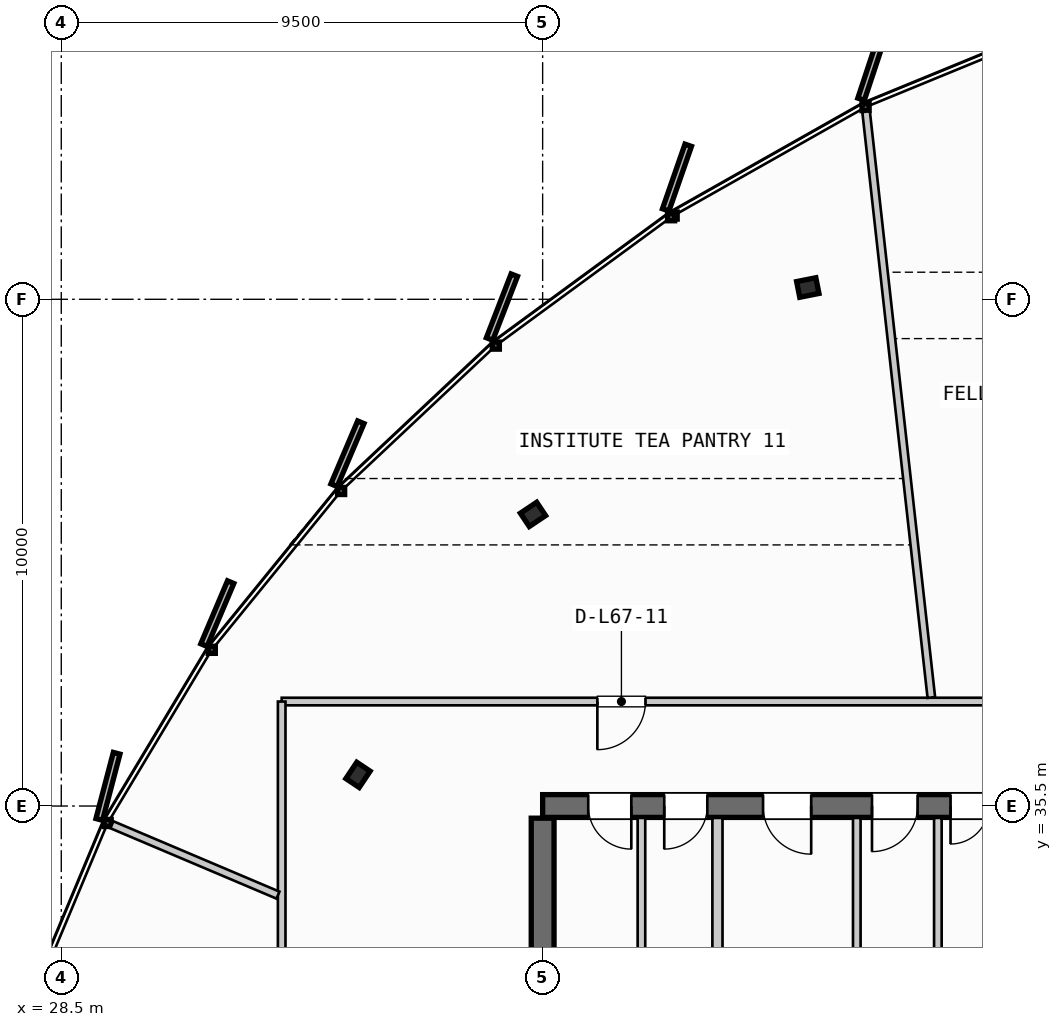
"""IFC4 building model, lengths in metres.
Left out: names, types, materials, properties, quantities, classifications, styles, units other than length and angle.
Written with IfcOpenShell. Run it as: python <this file> out.ifc"""

import sys

from ifc_helpers import new_model, si_unit, direction, frame, frame_2d, origin, origin_2d, place, context, subcontext, project, spatial, rectangle, i_section, extrude, source, transform, mapped, element, fill, save


model = new_model("IFC4")
c1 = context("Model", 3, precision=1e-05, world=origin(), true_north=direction((0.0, 1.0)))
c2 = subcontext(c1, "Body", "Model", "MODEL_VIEW")
j1 = project(units=[si_unit("LENGTHUNIT", "METRE"), si_unit("PLANEANGLEUNIT", "RADIAN")], contexts=[c1])
p1 = place(None, origin())
s1 = spatial("IfcSite", under=j1, at=p1, CompositionType="ELEMENT")
p2 = place(p1, origin())
s2 = spatial("IfcBuilding", under=s1, at=p2, CompositionType="ELEMENT")
p3 = place(p2, frame((0.0, 0.0, 256.0)))
s3 = spatial("IfcBuildingStorey", under=s2, at=p3, CompositionType="ELEMENT", Elevation=256.0)
p4 = place(p3, frame((55.6, 35.5, 0.0), z_axis=(0.0, 0.0, 1.0), x_axis=(-1.0, 0.0, 0.0)))
e1 = element("IfcWall", 1, at=p4, inside=s3, PredefinedType="SHEAR", context=c2, shape_type="SweptSolid", body=[
    extrude(rectangle(XDim=17.6, YDim=0.45, at=frame_2d((8.8, 0.0))), origin(), (0.0, 0.0, 1.0), 3.21),
])
p5 = place(p4, frame((8.05, 0.0, 0.0)))
e2 = element("IfcOpeningElement", 2, at=p5, cuts=e1, PredefinedType="OPENING", context=c2, shape_type="SweptSolid", body=[
    extrude(rectangle(XDim=1.5, YDim=2.2, at=frame_2d((0.75, 1.1))), frame((0.0, 0.235, 0.0), z_axis=(0.0, -1.0, 0.0), x_axis=(1.0, 0.0, 0.0)), (0.0, 0.0, 1.0), 0.47),
])
p6 = place(p4, frame((15.85, 0.0, 0.0)))
e3 = element("IfcOpeningElement", 3, at=p6, cuts=e1, PredefinedType="OPENING", context=c2, shape_type="SweptSolid", body=[
    extrude(rectangle(XDim=0.85, YDim=2.15, at=frame_2d((0.425, 1.075))), frame((0.0, 0.235, 0.0), z_axis=(0.0, -1.0, 0.0), x_axis=(1.0, 0.0, 0.0)), (0.0, 0.0, 1.0), 0.47),
])
p7 = place(p4, frame((14.35, 0.0, 0.0)))
e4 = element("IfcOpeningElement", 4, at=p7, cuts=e1, PredefinedType="OPENING", context=c2, shape_type="SweptSolid", body=[
    extrude(rectangle(XDim=0.85, YDim=2.15, at=frame_2d((0.425, 1.075))), frame((0.0, 0.235, 0.0), z_axis=(0.0, -1.0, 0.0), x_axis=(1.0, 0.0, 0.0)), (0.0, 0.0, 1.0), 0.47),
])
p8 = place(p4, frame((12.3, 0.0, 0.0)))
e5 = element("IfcOpeningElement", 5, at=p8, cuts=e1, PredefinedType="OPENING", context=c2, shape_type="SweptSolid", body=[
    extrude(rectangle(XDim=0.95, YDim=2.15, at=frame_2d((0.475, 1.075))), frame((0.0, 0.235, 0.0), z_axis=(0.0, -1.0, 0.0), x_axis=(1.0, 0.0, 0.0)), (0.0, 0.0, 1.0), 0.47),
])
p9 = place(p4, frame((10.2, 0.0, 0.0)))
e6 = element("IfcOpeningElement", 6, at=p9, cuts=e1, PredefinedType="OPENING", context=c2, shape_type="SweptSolid", body=[
    extrude(rectangle(XDim=0.9, YDim=2.15, at=frame_2d((0.45, 1.075))), frame((0.0, 0.235, 0.0), z_axis=(0.0, -1.0, 0.0), x_axis=(1.0, 0.0, 0.0)), (0.0, 0.0, 1.0), 0.47),
])
p10 = place(p3, frame((38.0, 35.26, 0.0), z_axis=(0.0, 0.0, 1.0), x_axis=(0.0, -1.0, 0.0)))
e7 = element("IfcWall", 7, at=p10, inside=s3, PredefinedType="SHEAR", context=c2, shape_type="SweptSolid", body=[
    extrude(rectangle(XDim=14.92, YDim=0.45, at=frame_2d((7.46, 0.0))), origin(), (0.0, 0.0, 1.0), 3.21),
])
p11 = place(p10, frame((5.21, 0.0, 0.0)))
e8 = element("IfcOpeningElement", 8, at=p11, cuts=e7, PredefinedType="OPENING", context=c2, shape_type="SweptSolid", body=[
    extrude(rectangle(XDim=1.1, YDim=2.2, at=frame_2d((0.55, 1.1))), frame((0.0, 0.235, 0.0), z_axis=(0.0, -1.0, 0.0), x_axis=(1.0, 0.0, 0.0)), (0.0, 0.0, 1.0), 0.47),
])
m1 = source(origin(), c2, "Body", "SweptSolid", [
    extrude(i_section(OverallWidth=0.387, OverallDepth=0.316, WebThickness=0.019, FlangeThickness=0.028, FilletRadius=0.015, at=origin_2d()), origin(), (0.0, 0.0, 1.0), 3.21),
])
for number, where, z_axis, x_axis in (
    (9, (43.233, 45.732, 0.0), (0.0, 0.0, 1.0), (-0.195, 0.981, 0.0)),
    (10, (37.81, 41.255, 0.0), (0.0, 0.0, 1.0), (-0.556, 0.831, 0.0)),
    (11, (34.356, 36.115, 0.0), (0.0, 0.0, 1.0), (-0.831, 0.556, 0.0)),
):
    element("IfcColumn", number, at=place(p3, frame(where, z_axis=z_axis, x_axis=x_axis)), inside=s3, PredefinedType="COLUMN", context=c2, shape_type="MappedRepresentation", body=[
        mapped(m1, transform((0.0, 0.0, 0.0), scale=1.0)),
    ])
p12 = place(p3, frame((41.45, 31.85, 0.0), z_axis=(0.0, 0.0, 1.0), x_axis=(0.0, 1.0, 0.0)))
e12 = element("IfcWall", 12, at=p12, inside=s3, PredefinedType="PARTITIONING", context=c2, shape_type="SweptSolid", body=[
    extrude(rectangle(XDim=3.415, YDim=0.2, at=frame_2d((1.708, 0.0))), origin(), (0.0, 0.0, 1.0), 2.28),
])
for number, where, z_axis, x_axis in (
    (13, (45.8, 31.85, 0.0), (0.0, 0.0, 1.0), (0.0, 1.0, 0.0)),
    (14, (39.95, 31.85, 0.0), (0.0, 0.0, 1.0), (0.0, 1.0, 0.0)),
):
    element("IfcWall", number, at=place(p3, frame(where, z_axis=z_axis, x_axis=x_axis)), inside=s3, PredefinedType="PARTITIONING", context=c2, shape_type="SweptSolid", body=[
        extrude(rectangle(XDim=3.415, YDim=0.15, at=frame_2d((1.708, 0.0))), origin(), (0.0, 0.0, 1.0), 2.28),
    ])
p13 = place(p3, frame((44.2, 31.85, 0.0), z_axis=(0.0, 0.0, 1.0), x_axis=(0.0, 1.0, 0.0)))
e15 = element("IfcWall", 15, at=p13, inside=s3, PredefinedType="PLUMBINGWALL", context=c2, shape_type="SweptSolid", body=[
    extrude(rectangle(XDim=3.415, YDim=0.15, at=frame_2d((1.708, 0.0))), origin(), (0.0, 0.0, 1.0), 2.28),
])
p14 = place(p3, frame((60.888, 37.562, 0.0), z_axis=(0.0, 0.0, 1.0), x_axis=(-1.0, 0.0, 0.0)))
e16 = element("IfcWall", 16, at=p14, inside=s3, PredefinedType="PARTITIONING", context=c2, shape_type="SweptSolid", body=[
    extrude(rectangle(XDim=28.038, YDim=0.15, at=frame_2d((14.019, 0.0))), origin(), (0.0, 0.0, 1.0), 2.28),
])
p15 = place(p14, frame((5.994, 0.0, 0.0)))
e17 = element("IfcOpeningElement", 17, at=p15, cuts=e16, PredefinedType="OPENING", context=c2, shape_type="SweptSolid", body=[
    extrude(rectangle(XDim=0.95, YDim=2.15, at=frame_2d((0.475, 1.075))), frame((0.0, 0.085, 0.0), z_axis=(0.0, -1.0, 0.0), x_axis=(1.0, 0.0, 0.0)), (0.0, 0.0, 1.0), 0.17),
])
p16 = place(p14, frame((12.306, 0.0, 0.0)))
e18 = element("IfcOpeningElement", 18, at=p16, cuts=e16, PredefinedType="OPENING", context=c2, shape_type="SweptSolid", body=[
    extrude(rectangle(XDim=0.95, YDim=2.15, at=frame_2d((0.475, 1.075))), frame((0.0, 0.085, 0.0), z_axis=(0.0, -1.0, 0.0), x_axis=(1.0, 0.0, 0.0)), (0.0, 0.0, 1.0), 0.17),
])
p17 = place(p14, frame((20.858, 0.0, 0.0)))
e19 = element("IfcOpeningElement", 19, at=p17, cuts=e16, PredefinedType="OPENING", context=c2, shape_type="SweptSolid", body=[
    extrude(rectangle(XDim=0.95, YDim=2.15, at=frame_2d((0.475, 1.075))), frame((0.0, 0.085, 0.0), z_axis=(0.0, -1.0, 0.0), x_axis=(1.0, 0.0, 0.0)), (0.0, 0.0, 1.0), 0.17),
])
p18 = place(p3, frame((32.85, 37.562, 0.0), z_axis=(0.0, 0.0, 1.0), x_axis=(0.0, -1.0, 0.0)))
e20 = element("IfcWall", 20, at=p18, inside=s3, PredefinedType="PARTITIONING", context=c2, shape_type="SweptSolid", body=[
    extrude(rectangle(XDim=19.293, YDim=0.15, at=frame_2d((9.646, 0.0))), origin(), (0.0, 0.0, 1.0), 2.28),
])
p19 = place(p18, frame((16.354, 0.0, 0.0)))
e21 = element("IfcOpeningElement", 21, at=p19, cuts=e20, PredefinedType="OPENING", context=c2, shape_type="SweptSolid", body=[
    extrude(rectangle(XDim=0.95, YDim=2.15, at=frame_2d((0.475, 1.075))), frame((0.0, 0.085, 0.0), z_axis=(0.0, -1.0, 0.0), x_axis=(1.0, 0.0, 0.0)), (0.0, 0.0, 1.0), 0.17),
])
p20 = place(p18, frame((8.92, 0.0, 0.0)))
e22 = element("IfcOpeningElement", 22, at=p20, cuts=e20, PredefinedType="OPENING", context=c2, shape_type="SweptSolid", body=[
    extrude(rectangle(XDim=0.95, YDim=2.15, at=frame_2d((0.475, 1.075))), frame((0.0, 0.085, 0.0), z_axis=(0.0, -1.0, 0.0), x_axis=(1.0, 0.0, 0.0)), (0.0, 0.0, 1.0), 0.17),
])
p21 = place(p3, frame((45.671, 37.642, 0.0), z_axis=(0.0, 0.0, 1.0), x_axis=(-0.110707939732, 0.993852983132, 0.0)))
e23 = element("IfcWall", 23, at=p21, inside=s3, PredefinedType="PARTITIONING", context=c2, shape_type="SweptSolid", body=[
    extrude(rectangle(XDim=11.633, YDim=0.15, at=frame_2d((5.816, 0.0))), origin(), (0.0, 0.0, 1.0), 2.28),
])
p22 = place(p3, frame((32.776, 33.741, 0.0), z_axis=(0.0, 0.0, 1.0), x_axis=(-0.920716223147, 0.390232797743, 0.0)))
e24 = element("IfcWall", 24, at=p22, inside=s3, PredefinedType="PARTITIONING", context=c2, shape_type="SweptSolid", body=[
    extrude(rectangle(XDim=3.56, YDim=0.15, at=frame_2d((1.78, 0.0))), origin(), (0.0, 0.0, 1.0), 2.28),
])
m2 = source(origin(), c2, "Body", "SweptSolid", [
    extrude(rectangle(XDim=1.5, YDim=2.2, at=frame_2d((0.75, 1.1))), frame((0.0, 0.025, 0.0), z_axis=(0.0, -1.0, 0.0), x_axis=(1.0, 0.0, 0.0)), (0.0, 0.0, 1.0), 0.05),
])
p23 = place(p5, origin())
e25 = element("IfcDoor", 25, at=p23, inside=s3, OperationType="DOUBLE_DOOR_SINGLE_SWING", PredefinedType="DOOR", context=c2, shape_type="MappedRepresentation", body=[
    mapped(m2, transform((0.0, 0.0, 0.0), scale=1.0)),
])
fill(e2, e25)
m3 = source(origin(), c2, "Body", "SweptSolid", [
    extrude(rectangle(XDim=0.85, YDim=2.15, at=frame_2d((0.425, 1.075))), frame((0.0, 0.025, 0.0), z_axis=(0.0, -1.0, 0.0), x_axis=(1.0, 0.0, 0.0)), (0.0, 0.0, 1.0), 0.05),
])
p24 = place(p6, origin())
e26 = element("IfcDoor", 26, at=p24, inside=s3, OperationType="SINGLE_SWING_LEFT", PredefinedType="DOOR", context=c2, shape_type="MappedRepresentation", body=[
    mapped(m3, transform((0.0, 0.0, 0.0), scale=1.0)),
])
fill(e3, e26)
p25 = place(p7, origin())
e27 = element("IfcDoor", 27, at=p25, inside=s3, OperationType="SINGLE_SWING_RIGHT", PredefinedType="DOOR", context=c2, shape_type="MappedRepresentation", body=[
    mapped(m3, transform((0.0, 0.0, 0.0), scale=1.0)),
])
fill(e4, e27)
m4 = source(origin(), c2, "Body", "SweptSolid", [
    extrude(rectangle(XDim=0.95, YDim=2.15, at=frame_2d((0.475, 1.075))), frame((0.0, 0.025, 0.0), z_axis=(0.0, -1.0, 0.0), x_axis=(1.0, 0.0, 0.0)), (0.0, 0.0, 1.0), 0.05),
])
p26 = place(p8, origin())
e28 = element("IfcDoor", 28, at=p26, inside=s3, OperationType="SINGLE_SWING_LEFT", PredefinedType="DOOR", context=c2, shape_type="MappedRepresentation", body=[
    mapped(m4, transform((0.0, 0.0, 0.0), scale=1.0)),
])
fill(e5, e28)
m5 = source(origin(), c2, "Body", "SweptSolid", [
    extrude(rectangle(XDim=0.9, YDim=2.15, at=frame_2d((0.45, 1.075))), frame((0.0, 0.025, 0.0), z_axis=(0.0, -1.0, 0.0), x_axis=(1.0, 0.0, 0.0)), (0.0, 0.0, 1.0), 0.05),
])
p27 = place(p9, origin())
e29 = element("IfcDoor", 29, at=p27, inside=s3, OperationType="SINGLE_SWING_RIGHT", PredefinedType="DOOR", context=c2, shape_type="MappedRepresentation", body=[
    mapped(m5, transform((0.0, 0.0, 0.0), scale=1.0)),
])
fill(e6, e29)
p28 = place(p17, origin())
e30 = element("IfcDoor", 30, at=p28, inside=s3, OperationType="SINGLE_SWING_RIGHT", PredefinedType="DOOR", context=c2, shape_type="MappedRepresentation", body=[
    mapped(m4, transform((0.0, 0.0, 0.0), scale=1.0)),
])
fill(e19, e30)
save(model, sys.argv[1])
